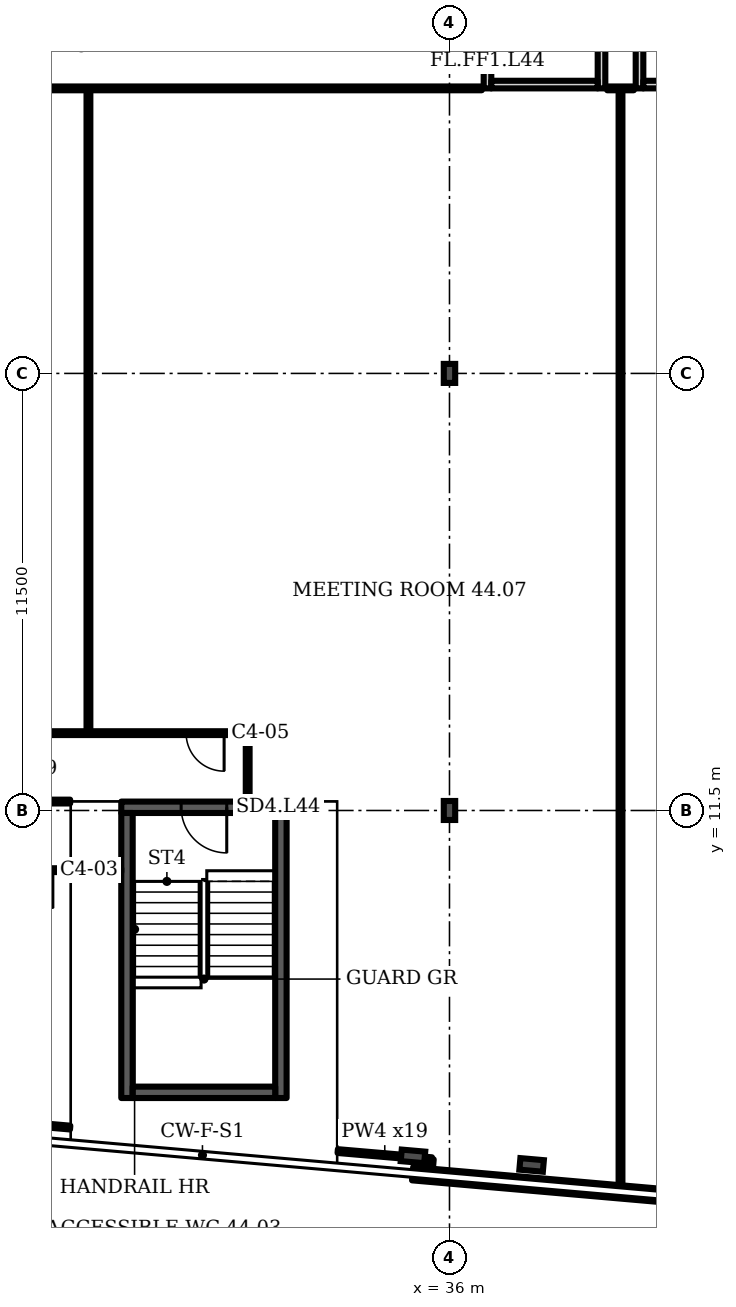
"""IFC4 building model, lengths in metres.
Left out: names, types, materials, properties, quantities, classifications, styles, units other than length and angle.
Written with IfcOpenShell. Run it as: python <this file> out.ifc"""

import sys

from ifc_helpers import new_model, si_unit, direction, frame, frame_2d, origin, origin_2d, place, context, subcontext, project, spatial, rectangle, i_section, extrude, element, fill, save


model = new_model("IFC4")
c1 = context("Model", 3, precision=1e-05, world=origin(), true_north=direction((0.0, 1.0)))
c2 = subcontext(c1, "Body", "Model", "MODEL_VIEW")
j1 = project(units=[si_unit("LENGTHUNIT", "METRE"), si_unit("PLANEANGLEUNIT", "RADIAN")], contexts=[c1])
p1 = place(None, origin())
s1 = spatial("IfcSite", under=j1, at=p1, CompositionType="ELEMENT")
p2 = place(p1, origin())
s2 = spatial("IfcBuilding", under=s1, at=p2, CompositionType="ELEMENT")
p3 = place(p2, frame((0.0, 0.0, 180.7)))
s3 = spatial("IfcBuildingStorey", under=s2, at=p3, CompositionType="ELEMENT", Elevation=180.7)
for number, where, z_axis, x_axis in (
    (1, (35.039, 2.399, 0.0), (0.0, 0.0, 1.0), (-0.087, -0.996, 0.0)),
    (2, (38.161, 2.174, 0.0), (0.0, 0.0, 1.0), (-0.087, -0.996, 0.0)),
):
    element("IfcColumn", number, at=place(p3, frame(where, z_axis=z_axis, x_axis=x_axis)), inside=s3, PredefinedType="COLUMN", context=c2, shape_type="SweptSolid", body=[
        extrude(i_section(OverallWidth=0.305, OverallDepth=0.62, WebThickness=0.021, FlangeThickness=0.04, FilletRadius=0.027, at=origin_2d()), origin(), (0.0, 0.0, 1.0), 3.6),
    ])
for number, where, z_axis, x_axis in (
    (3, (36.0, 11.5, 0.0), (0.0, 0.0, 1.0), (1.0, 0.0, 0.0)),
    (4, (36.0, 23.0, 0.0), (0.0, 0.0, 1.0), (1.0, 0.0, 0.0)),
):
    element("IfcColumn", number, at=place(p3, frame(where, z_axis=z_axis, x_axis=x_axis)), inside=s3, PredefinedType="COLUMN", context=c2, shape_type="SweptSolid", body=[
        extrude(i_section(OverallWidth=0.3, OverallDepth=0.5, WebThickness=0.014, FlangeThickness=0.028, FilletRadius=0.027, at=origin_2d()), origin(), (0.0, 0.0, 1.0), 3.6),
    ])
p4 = place(p3, frame((35.03, 1.943, 0.0), z_axis=(0.0, 0.0, 1.0), x_axis=(0.996199, -0.08714, 0.0)))
e5 = element("IfcWall", 5, at=p4, inside=s3, PredefinedType="SOLIDWALL", context=c2, shape_type="SweptSolid", body=[
    extrude(rectangle(XDim=11.028, YDim=0.35, at=frame_2d((5.514, 0.0))), origin(), (0.0, 0.0, 1.0), 1.0),
])
p5 = place(p3, frame((37.0, 30.5, 0.0), z_axis=(0.0, 0.0, 1.0), x_axis=(0.0, 1.0, 0.0)))
e6 = element("IfcWall", 6, at=p5, inside=s3, PredefinedType="PARTITIONING", context=c2, shape_type="SweptSolid", body=[
    extrude(rectangle(XDim=3.5, YDim=0.2, at=frame_2d((1.75, 0.0))), origin(), (0.0, 0.0, 1.0), 3.2),
])
p6 = place(p5, frame((1.2, 0.0, 0.0)))
e7 = element("IfcOpeningElement", 7, at=p6, cuts=e6, PredefinedType="OPENING", context=c2, shape_type="SweptSolid", body=[
    extrude(rectangle(XDim=1.1, YDim=2.1, at=frame_2d((0.55, 1.05))), frame((0.0, 0.11, 0.0), z_axis=(0.0, -1.0, 0.0), x_axis=(1.0, 0.0, 0.0)), (0.0, 0.0, 1.0), 0.22),
])
p7 = place(p3, frame((40.0, 30.5, 0.0), z_axis=(0.0, 0.0, 1.0), x_axis=(0.0, 1.0, 0.0)))
e8 = element("IfcWall", 8, at=p7, inside=s3, PredefinedType="PARTITIONING", context=c2, shape_type="SweptSolid", body=[
    extrude(rectangle(XDim=3.5, YDim=0.2, at=frame_2d((1.75, 0.0))), origin(), (0.0, 0.0, 1.0), 3.2),
])
p8 = place(p3, frame((37.1, 30.6, 0.0), z_axis=(0.0, 0.0, 1.0), x_axis=(1.0, 0.0, 0.0)))
e9 = element("IfcWall", 9, at=p8, inside=s3, PredefinedType="PARTITIONING", context=c2, shape_type="SweptSolid", body=[
    extrude(rectangle(XDim=2.8, YDim=0.2, at=frame_2d((1.4, 0.0))), origin(), (0.0, 0.0, 1.0), 3.2),
])
p9 = place(p3, frame((41.0, 30.5, 0.0), z_axis=(0.0, 0.0, 1.0), x_axis=(0.0, 1.0, 0.0)))
e10 = element("IfcWall", 10, at=p9, inside=s3, PredefinedType="PARTITIONING", context=c2, shape_type="SweptSolid", body=[
    extrude(rectangle(XDim=3.5, YDim=0.2, at=frame_2d((1.75, 0.0))), origin(), (0.0, 0.0, 1.0), 3.2),
])
p10 = place(p3, frame((41.1, 30.6, 0.0), z_axis=(0.0, 0.0, 1.0), x_axis=(1.0, 0.0, 0.0)))
e11 = element("IfcWall", 11, at=p10, inside=s3, PredefinedType="PARTITIONING", context=c2, shape_type="SweptSolid", body=[
    extrude(rectangle(XDim=2.8, YDim=0.2, at=frame_2d((1.4, 0.0))), origin(), (0.0, 0.0, 1.0), 3.2),
])
p11 = place(p3, frame((27.364, 11.584, 0.0), z_axis=(0.0, 0.0, 1.0), x_axis=(1.0, 0.0, 0.0)))
e12 = element("IfcWall", 12, at=p11, inside=s3, PredefinedType="SHEAR", context=c2, shape_type="SweptSolid", body=[
    extrude(rectangle(XDim=4.35, YDim=0.3, at=frame_2d((2.175, 0.0))), origin(), (0.0, 0.0, 1.0), 3.2),
])
p12 = place(p11, frame((1.575, 0.0, 0.0)))
e13 = element("IfcOpeningElement", 13, at=p12, cuts=e12, PredefinedType="OPENING", context=c2, shape_type="SweptSolid", body=[
    extrude(rectangle(XDim=1.2, YDim=2.1, at=frame_2d((0.6, 1.05))), frame((0.0, 0.16, 0.0), z_axis=(0.0, -1.0, 0.0), x_axis=(1.0, 0.0, 0.0)), (0.0, 0.0, 1.0), 0.32),
])
p13 = place(p3, frame((16.9, 11.735, 0.0), z_axis=(0.0, 0.0, 1.0), x_axis=(1.0, 0.0, 0.0)))
e14 = element("IfcWall", 14, at=p13, inside=s3, PredefinedType="PARTITIONING", context=c2, shape_type="SweptSolid", body=[
    extrude(rectangle(XDim=9.119, YDim=0.1, at=frame_2d((4.56, 0.0))), origin(), (0.0, 0.0, 1.0), 3.2),
])
p14 = place(p13, frame((0.155, 0.0, 0.0)))
e15 = element("IfcOpeningElement", 15, at=p14, cuts=e14, PredefinedType="OPENING", context=c2, shape_type="SweptSolid", body=[
    extrude(rectangle(XDim=1.8, YDim=2.1, at=frame_2d((0.9, 1.05))), frame((0.0, 0.06, 0.0), z_axis=(0.0, -1.0, 0.0), x_axis=(1.0, 0.0, 0.0)), (0.0, 0.0, 1.0), 0.12),
])
p15 = place(p3, frame((17.8, 30.5, 0.0), z_axis=(0.0, 0.0, 1.0), x_axis=(1.0, 0.0, 0.0)))
e16 = element("IfcWall", 16, at=p15, inside=s3, PredefinedType="PARTITIONING", context=c2, shape_type="SweptSolid", body=[
    extrude(rectangle(XDim=19.05, YDim=0.1, at=frame_2d((9.525, 0.0))), origin(), (0.0, 0.0, 1.0), 3.2),
])
p16 = place(p3, frame((18.5, 9.93, 0.0), z_axis=(0.0, 0.0, 1.0), x_axis=(1.0, 0.0, 0.0)))
e17 = element("IfcWall", 17, at=p16, inside=s3, PredefinedType="PARTITIONING", context=c2, shape_type="SweptSolid", body=[
    extrude(rectangle(XDim=8.864, YDim=0.1, at=frame_2d((4.432, 0.0))), origin(), (0.0, 0.0, 1.0), 3.2),
])
p17 = place(p16, frame((1.073, 0.0, 0.0)))
e18 = element("IfcOpeningElement", 18, at=p17, cuts=e17, PredefinedType="OPENING", context=c2, shape_type="SweptSolid", body=[
    extrude(rectangle(XDim=0.9, YDim=2.1, at=frame_2d((0.45, 1.05))), frame((0.0, 0.06, 0.0), z_axis=(0.0, -1.0, 0.0), x_axis=(1.0, 0.0, 0.0)), (0.0, 0.0, 1.0), 0.12),
])
p18 = place(p16, frame((3.808, 0.0, 0.0)))
e19 = element("IfcOpeningElement", 19, at=p18, cuts=e17, PredefinedType="OPENING", context=c2, shape_type="SweptSolid", body=[
    extrude(rectangle(XDim=0.9, YDim=2.1, at=frame_2d((0.45, 1.05))), frame((0.0, 0.06, 0.0), z_axis=(0.0, -1.0, 0.0), x_axis=(1.0, 0.0, 0.0)), (0.0, 0.0, 1.0), 0.12),
])
p19 = place(p16, frame((6.063, 0.0, 0.0)))
e20 = element("IfcOpeningElement", 20, at=p19, cuts=e17, PredefinedType="OPENING", context=c2, shape_type="SweptSolid", body=[
    extrude(rectangle(XDim=1.0, YDim=2.1, at=frame_2d((0.5, 1.05))), frame((0.0, 0.06, 0.0), z_axis=(0.0, -1.0, 0.0), x_axis=(1.0, 0.0, 0.0)), (0.0, 0.0, 1.0), 0.12),
])
p20 = place(p3, frame((18.7, 13.535, 0.0), z_axis=(0.0, 0.0, 1.0), x_axis=(1.0, 0.0, 0.0)))
e21 = element("IfcWall", 21, at=p20, inside=s3, PredefinedType="PARTITIONING", context=c2, shape_type="SweptSolid", body=[
    extrude(rectangle(XDim=11.99, YDim=0.1, at=frame_2d((5.995, 0.0))), origin(), (0.0, 0.0, 1.0), 3.2),
])
p21 = place(p20, frame((10.37, 0.0, 0.0)))
e22 = element("IfcOpeningElement", 22, at=p21, cuts=e21, PredefinedType="OPENING", context=c2, shape_type="SweptSolid", body=[
    extrude(rectangle(XDim=1.0, YDim=2.1, at=frame_2d((0.5, 1.05))), frame((0.0, 0.06, 0.0), z_axis=(0.0, -1.0, 0.0), x_axis=(1.0, 0.0, 0.0)), (0.0, 0.0, 1.0), 0.12),
])
p22 = place(p3, frame((26.019, 3.157, 0.0), z_axis=(0.0, 0.0, 1.0), x_axis=(-0.996266, 0.086322, 0.0)))
e23 = element("IfcWall", 23, at=p22, inside=s3, PredefinedType="PARTITIONING", context=c2, shape_type="SweptSolid", body=[
    extrude(rectangle(XDim=4.556, YDim=0.1, at=frame_2d((2.278, 0.0))), origin(), (0.0, 0.0, 1.0), 2.58),
])
p23 = place(p3, frame((26.5, 13.535, 0.0), z_axis=(0.0, 0.0, 1.0), x_axis=(0.0, 1.0, 0.0)))
e24 = element("IfcWall", 24, at=p23, inside=s3, PredefinedType="PARTITIONING", context=c2, shape_type="SweptSolid", body=[
    extrude(rectangle(XDim=16.965, YDim=0.1, at=frame_2d((8.482, 0.0))), origin(), (0.0, 0.0, 1.0), 3.2),
])
p24 = place(p3, frame((30.69, 11.754, 0.0), z_axis=(0.0, 0.0, 1.0), x_axis=(0.0, 1.0, 0.0)))
e25 = element("IfcWall", 25, at=p24, inside=s3, PredefinedType="PARTITIONING", context=c2, shape_type="SweptSolid", body=[
    extrude(rectangle(XDim=1.781, YDim=0.1, at=frame_2d((0.89, 0.0))), origin(), (0.0, 0.0, 1.0), 3.2),
])
p25 = place(p3, frame((35.502, 1.927, 0.0), z_axis=(0.0, 0.0, 1.0), x_axis=(0.083045, 0.996542, 0.0)))
e26 = element("IfcWall", 26, at=p25, inside=s3, PredefinedType="PARTITIONING", context=c2, shape_type="SweptSolid", body=[
    extrude(rectangle(XDim=0.4, YDim=0.1, at=frame_2d((0.2, 0.0))), origin(), (0.0, 0.0, 1.0), 3.2),
])
p26 = place(p3, frame((35.535, 2.325, 0.0), z_axis=(0.0, 0.0, 1.0), x_axis=(-0.996311, 0.085867, 0.0)))
e27 = element("IfcWall", 27, at=p26, inside=s3, PredefinedType="PARTITIONING", context=c2, shape_type="SweptSolid", body=[
    extrude(rectangle(XDim=2.485, YDim=0.1, at=frame_2d((1.243, 0.0))), origin(), (0.0, 0.0, 1.0), 2.58),
])
p27 = place(p3, frame((40.5, 1.489, 0.0), z_axis=(0.0, 0.0, 1.0), x_axis=(0.0, 1.0, 0.0)))
e28 = element("IfcWall", 28, at=p27, inside=s3, PredefinedType="PARTITIONING", context=c2, shape_type="SweptSolid", body=[
    extrude(rectangle(XDim=29.011, YDim=0.1, at=frame_2d((14.505, 0.0))), origin(), (0.0, 0.0, 1.0), 3.2),
])
p28 = place(p3, frame((40.15, 30.5, 0.0), z_axis=(0.0, 0.0, 1.0), x_axis=(1.0, 0.0, 0.0)))
e29 = element("IfcWall", 29, at=p28, inside=s3, PredefinedType="PARTITIONING", context=c2, shape_type="SweptSolid", body=[
    extrude(rectangle(XDim=0.7, YDim=0.1, at=frame_2d((0.35, 0.0))), origin(), (0.0, 0.0, 1.0), 3.2),
])
for number, where, z_axis, x_axis in (
    (30, (27.514, 3.934, 0.0), (0.0, 0.0, 1.0), (0.0, 1.0, 0.0)),
    (31, (31.564, 3.934, 0.0), (0.0, 0.0, 1.0), (0.0, 1.0, 0.0)),
):
    element("IfcWall", number, at=place(p3, frame(where, z_axis=z_axis, x_axis=x_axis)), inside=s3, PredefinedType="SHEAR", context=c2, shape_type="SweptSolid", body=[
        extrude(rectangle(XDim=7.5, YDim=0.3, at=frame_2d((3.75, 0.0))), origin(), (0.0, 0.0, 1.0), 3.2),
    ])
p29 = place(p3, frame((27.664, 4.084, 0.0), z_axis=(0.0, 0.0, 1.0), x_axis=(1.0, 0.0, 0.0)))
e32 = element("IfcWall", 32, at=p29, inside=s3, PredefinedType="SHEAR", context=c2, shape_type="SweptSolid", body=[
    extrude(rectangle(XDim=3.75, YDim=0.3, at=frame_2d((1.875, 0.0))), origin(), (0.0, 0.0, 1.0), 3.2),
])
p30 = place(p12, origin())
e33 = element("IfcDoor", 33, at=p30, inside=s3, OperationType="SINGLE_SWING_RIGHT", PredefinedType="DOOR", context=c2, shape_type="SweptSolid", body=[
    extrude(rectangle(XDim=1.2, YDim=2.1, at=frame_2d((0.6, 1.05))), frame((0.0, 0.025, 0.0), z_axis=(0.0, -1.0, 0.0), x_axis=(1.0, 0.0, 0.0)), (0.0, 0.0, 1.0), 0.05),
])
fill(e13, e33)
p31 = place(p19, origin())
e34 = element("IfcDoor", 34, at=p31, inside=s3, OperationType="SINGLE_SWING_RIGHT", PredefinedType="DOOR", context=c2, shape_type="SweptSolid", body=[
    extrude(rectangle(XDim=1.0, YDim=2.1, at=frame_2d((0.5, 1.05))), frame((0.0, 0.025, 0.0), z_axis=(0.0, -1.0, 0.0), x_axis=(1.0, 0.0, 0.0)), (0.0, 0.0, 1.0), 0.05),
])
fill(e20, e34)
p32 = place(p21, origin())
e35 = element("IfcDoor", 35, at=p32, inside=s3, OperationType="SINGLE_SWING_RIGHT", PredefinedType="DOOR", context=c2, shape_type="SweptSolid", body=[
    extrude(rectangle(XDim=1.0, YDim=2.1, at=frame_2d((0.5, 1.05))), frame((0.0, 0.025, 0.0), z_axis=(0.0, -1.0, 0.0), x_axis=(1.0, 0.0, 0.0)), (0.0, 0.0, 1.0), 0.05),
])
fill(e22, e35)
save(model, sys.argv[1])
